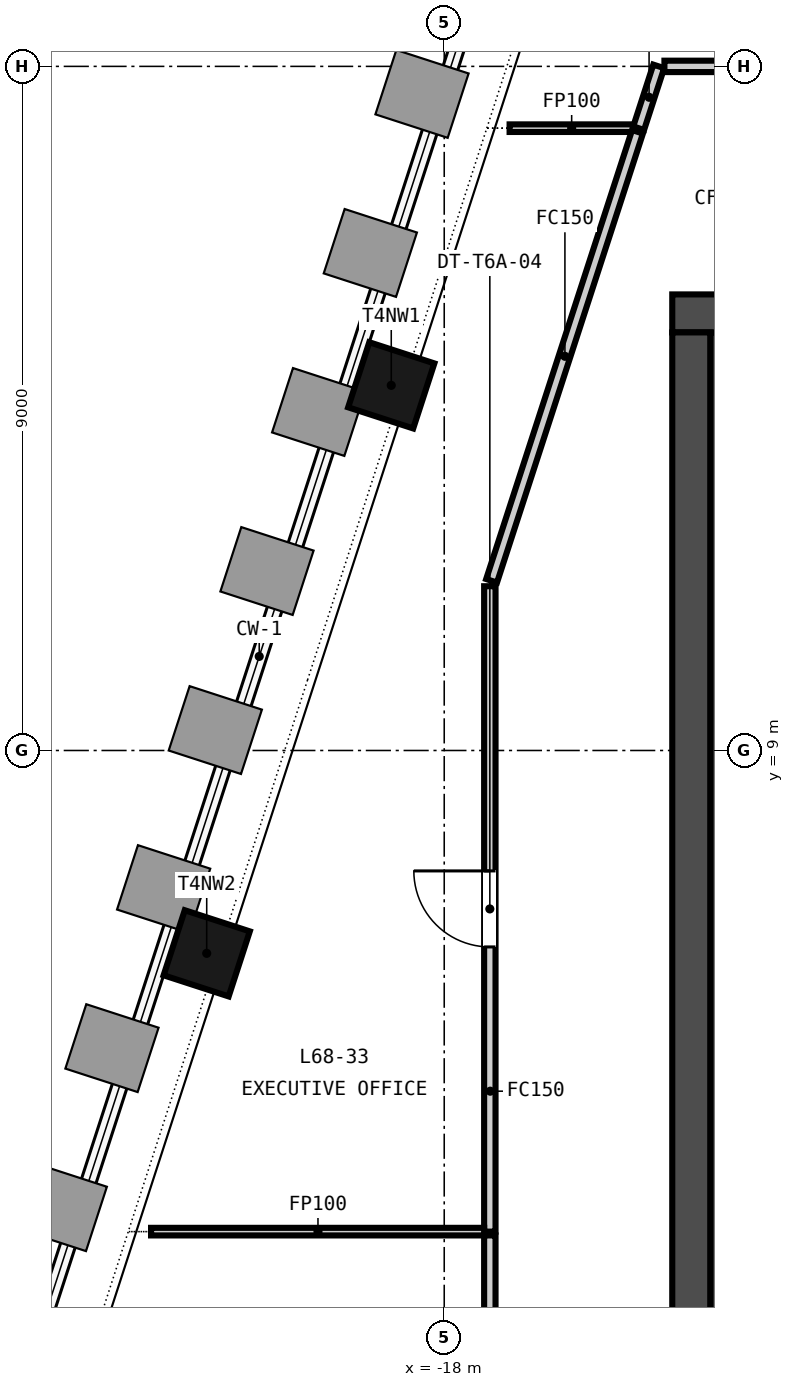
"""IFC4 building model, lengths in metres.
Left out: names, types, materials, properties, quantities, classifications, styles, units other than length and angle.
Written with IfcOpenShell. Run it as: python <this file> out.ifc"""

import sys

from ifc_helpers import new_model, si_unit, direction, frame, frame_2d, origin, origin_2d, place, context, subcontext, project, spatial, rectangle, extrude, element, fill, save


model = new_model("IFC4")
c1 = context("Model", 3, precision=1e-05, world=origin(), true_north=direction((0.0, 1.0)))
c2 = subcontext(c1, "Body", "Model", "MODEL_VIEW")
j1 = project(units=[si_unit("LENGTHUNIT", "METRE"), si_unit("PLANEANGLEUNIT", "RADIAN")], contexts=[c1])
p1 = place(None, origin())
s1 = spatial("IfcSite", under=j1, at=p1, CompositionType="ELEMENT")
p2 = place(p1, origin())
s2 = spatial("IfcBuilding", under=s1, at=p2, CompositionType="ELEMENT")
p3 = place(p2, frame((0.0, 0.0, 268.25)))
s3 = spatial("IfcBuildingStorey", under=s2, at=p3, CompositionType="ELEMENT", Elevation=268.25)
p4 = place(p3, frame((-15.0, 14.75, -0.15), z_axis=(0.0, 0.0, 1.0), x_axis=(1.0, 0.0, 0.0)))
e1 = element("IfcWall", 1, at=p4, inside=s3, PredefinedType="SOLIDWALL", context=c2, shape_type="SweptSolid", body=[
    extrude(rectangle(XDim=30.0, YDim=0.5, at=frame_2d((15.0, 0.0))), origin(), (0.0, 0.0, 1.0), 3.65),
])
p5 = place(p4, frame((9.25, 0.0, 0.15)))
e2 = element("IfcOpeningElement", 2, at=p5, cuts=e1, PredefinedType="OPENING", context=c2, shape_type="SweptSolid", body=[
    extrude(rectangle(XDim=1.5, YDim=2.1, at=frame_2d((0.75, 1.05))), frame((0.0, 0.26, 0.0), z_axis=(0.0, -1.0, 0.0), x_axis=(1.0, 0.0, 0.0)), (0.0, 0.0, 1.0), 0.52),
])
p6 = place(p4, frame((19.4, 0.0, 0.15)))
e3 = element("IfcOpeningElement", 3, at=p6, cuts=e1, PredefinedType="OPENING", context=c2, shape_type="SweptSolid", body=[
    extrude(rectangle(XDim=1.5, YDim=2.1, at=frame_2d((0.75, 1.05))), frame((0.0, 0.26, 0.0), z_axis=(0.0, -1.0, 0.0), x_axis=(1.0, 0.0, 0.0)), (0.0, 0.0, 1.0), 0.52),
])
p7 = place(p4, frame((1.5, 0.0, 0.15)))
e4 = element("IfcOpeningElement", 4, at=p7, cuts=e1, PredefinedType="OPENING", context=c2, shape_type="SweptSolid", body=[
    extrude(rectangle(XDim=1.2, YDim=2.1, at=frame_2d((0.6, 1.05))), frame((0.0, 0.26, 0.0), z_axis=(0.0, -1.0, 0.0), x_axis=(1.0, 0.0, 0.0)), (0.0, 0.0, 1.0), 0.52),
])
p8 = place(p4, frame((27.3, 0.0, 0.15)))
e5 = element("IfcOpeningElement", 5, at=p8, cuts=e1, PredefinedType="OPENING", context=c2, shape_type="SweptSolid", body=[
    extrude(rectangle(XDim=1.2, YDim=2.1, at=frame_2d((0.6, 1.05))), frame((0.0, 0.26, 0.0), z_axis=(0.0, -1.0, 0.0), x_axis=(1.0, 0.0, 0.0)), (0.0, 0.0, 1.0), 0.52),
])
p9 = place(p3, frame((-14.75, 0.5, -0.15), z_axis=(0.0, 0.0, 1.0), x_axis=(0.0, 1.0, 0.0)))
e6 = element("IfcWall", 6, at=p9, inside=s3, PredefinedType="SOLIDWALL", context=c2, shape_type="SweptSolid", body=[
    extrude(rectangle(XDim=14.0, YDim=0.5, at=frame_2d((7.0, 0.0))), origin(), (0.0, 0.0, 1.0), 3.65),
])
for number, where, z_axis, x_axis in (
    (7, (-18.697, 13.804, -0.15), (0.0, 0.0, 1.0), (-0.309, -0.951, 0.0)),
    (8, (-21.125, 6.331, -0.15), (0.0, 0.0, 1.0), (-0.309, -0.951, 0.0)),
):
    element("IfcColumn", number, at=place(p3, frame(where, z_axis=z_axis, x_axis=x_axis)), inside=s3, PredefinedType="COLUMN", context=c2, shape_type="SweptSolid", body=[
        extrude(rectangle(XDim=0.9, YDim=0.9, at=origin_2d()), origin(), (0.0, 0.0, 1.0), 3.65),
    ])
p10 = place(p3, frame((-14.25, 0.5, 0.0), z_axis=(0.0, 0.0, 1.0), x_axis=(0.0, 1.0, 0.0)))
e9 = element("IfcWall", 9, at=p10, inside=s3, PredefinedType="SOLIDWALL", context=c2, shape_type="SweptSolid", body=[
    extrude(rectangle(XDim=14.0, YDim=0.5, at=frame_2d((7.0, 0.0))), origin(), (0.0, 0.0, 1.0), 3.5),
])
p11 = place(p3, frame((-15.442, 17.187, 0.0), z_axis=(0.0, 0.0, 1.0), x_axis=(0.308763129345, 0.951138964588, 0.0)))
e10 = element("IfcWall", 10, at=p11, inside=s3, PredefinedType="PARTITIONING", context=c2, shape_type="SweptSolid", body=[
    extrude(rectangle(XDim=0.855, YDim=0.15, at=frame_2d((0.427, 0.0))), origin(), (0.0, 0.0, 1.0), 2.751),
])
p12 = place(p3, frame((-15.103, 18.0, 0.0), z_axis=(0.0, 0.0, 1.0), x_axis=(1.0, 0.0, 0.0)))
e11 = element("IfcWall", 11, at=p12, inside=s3, PredefinedType="PARTITIONING", context=c2, shape_type="SweptSolid", body=[
    extrude(rectangle(XDim=14.928, YDim=0.15, at=frame_2d((7.464, 0.0))), origin(), (0.0, 0.0, 1.0), 2.751),
])
p13 = place(p12, frame((6.964, 0.0, 0.0)))
e12 = element("IfcOpeningElement", 12, at=p13, cuts=e11, PredefinedType="OPENING", context=c2, shape_type="SweptSolid", body=[
    extrude(rectangle(XDim=1.0, YDim=2.1, at=frame_2d((0.5, 1.05))), frame((0.0, 0.085, 0.0), z_axis=(0.0, -1.0, 0.0), x_axis=(1.0, 0.0, 0.0)), (0.0, 0.0, 1.0), 0.17),
])
p14 = place(p3, frame((-17.14, 17.187, 0.0), z_axis=(0.0, 0.0, 1.0), x_axis=(1.0, 0.0, 0.0)))
e13 = element("IfcWall", 13, at=p14, inside=s3, PredefinedType="PARTITIONING", context=c2, shape_type="SweptSolid", body=[
    extrude(rectangle(XDim=1.623, YDim=0.1, at=frame_2d((0.812, 0.0))), origin(), (0.0, 0.0, 1.0), 2.751),
])
p15 = place(p3, frame((-17.4, 2.67, 0.0), z_axis=(0.0, 0.0, 1.0), x_axis=(0.0, 1.0, 0.0)))
e14 = element("IfcWall", 14, at=p15, inside=s3, PredefinedType="PARTITIONING", context=c2, shape_type="SweptSolid", body=[
    extrude(rectangle(XDim=8.491, YDim=0.15, at=frame_2d((4.246, 0.0))), origin(), (0.0, 0.0, 1.0), 2.751),
])
p16 = place(p15, frame((3.746, 0.0, 0.0)))
e15 = element("IfcOpeningElement", 15, at=p16, cuts=e14, PredefinedType="OPENING", context=c2, shape_type="SweptSolid", body=[
    extrude(rectangle(XDim=1.0, YDim=2.1, at=frame_2d((0.5, 1.05))), frame((0.0, 0.085, 0.0), z_axis=(0.0, -1.0, 0.0), x_axis=(1.0, 0.0, 0.0)), (0.0, 0.0, 1.0), 0.17),
])
p17 = place(p3, frame((-17.377, 11.232, 0.0), z_axis=(0.0, 0.0, 1.0), x_axis=(0.309001632963, 0.951061507383, 0.0)))
e16 = element("IfcWall", 16, at=p17, inside=s3, PredefinedType="PARTITIONING", context=c2, shape_type="SweptSolid", body=[
    extrude(rectangle(XDim=6.211, YDim=0.15, at=frame_2d((3.105, 0.0))), origin(), (0.0, 0.0, 1.0), 2.751),
])
p18 = place(p3, frame((-21.857, 2.67, 0.0), z_axis=(0.0, 0.0, 1.0), x_axis=(1.0, 0.0, 0.0)))
e17 = element("IfcWall", 17, at=p18, inside=s3, PredefinedType="PARTITIONING", context=c2, shape_type="SweptSolid", body=[
    extrude(rectangle(XDim=4.382, YDim=0.1, at=frame_2d((2.191, 0.0))), origin(), (0.0, 0.0, 1.0), 2.751),
])
p19 = place(p3, frame((-17.4, -2.925, 0.0), z_axis=(0.0, 0.0, 1.0), x_axis=(0.0, 1.0, 0.0)))
e18 = element("IfcWall", 18, at=p19, inside=s3, PredefinedType="PARTITIONING", context=c2, shape_type="SweptSolid", body=[
    extrude(rectangle(XDim=5.545, YDim=0.15, at=frame_2d((2.772, 0.0))), origin(), (0.0, 0.0, 1.0), 2.751),
])
p20 = place(p19, frame((1.873, 0.0, 0.0)))
e19 = element("IfcOpeningElement", 19, at=p20, cuts=e18, PredefinedType="OPENING", context=c2, shape_type="SweptSolid", body=[
    extrude(rectangle(XDim=1.8, YDim=2.1, at=frame_2d((0.9, 1.05))), frame((0.0, 0.085, 0.0), z_axis=(0.0, -1.0, 0.0), x_axis=(1.0, 0.0, 0.0)), (0.0, 0.0, 1.0), 0.17),
])
p21 = place(p16, origin())
e20 = element("IfcDoor", 20, at=p21, inside=s3, OperationType="SINGLE_SWING_RIGHT", PredefinedType="DOOR", context=c2, shape_type="SweptSolid", body=[
    extrude(rectangle(XDim=1.0, YDim=2.1, at=frame_2d((0.5, 1.05))), frame((0.0, 0.025, 0.0), z_axis=(0.0, -1.0, 0.0), x_axis=(1.0, 0.0, 0.0)), (0.0, 0.0, 1.0), 0.05),
])
fill(e15, e20)
save(model, sys.argv[1])
